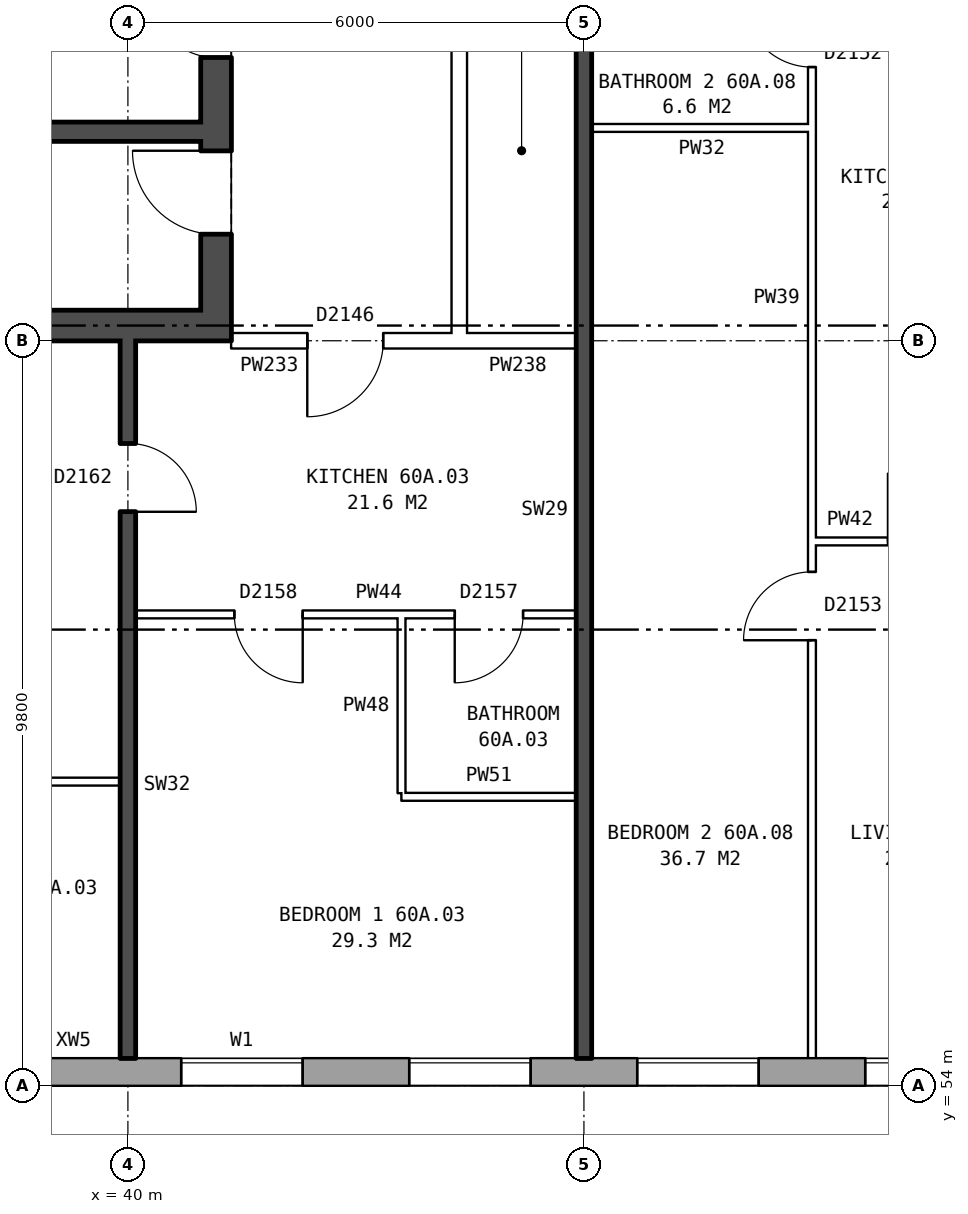
"""IFC4 building model, lengths in metres.
Left out: names, types, materials, properties, quantities, classifications, styles, units other than length and angle.
Written with IfcOpenShell. Run it as: python <this file> out.ifc"""

import sys

from ifc_helpers import new_model, si_unit, direction, frame, frame_2d, origin, place, context, subcontext, project, spatial, rectangle, extrude, element, fill, save


model = new_model("IFC4")
c1 = context("Model", 3, precision=1e-05, world=origin(), true_north=direction((0.0, 1.0)))
c2 = subcontext(c1, "Body", "Model", "MODEL_VIEW")
j1 = project(units=[si_unit("LENGTHUNIT", "METRE"), si_unit("PLANEANGLEUNIT", "RADIAN")], contexts=[c1])
p1 = place(None, origin())
s1 = spatial("IfcSite", under=j1, at=p1, CompositionType="ELEMENT")
p2 = place(p1, origin())
s2 = spatial("IfcBuilding", under=s1, at=p2, CompositionType="ELEMENT")
p3 = place(p2, frame((0.0, 0.0, 212.1)))
s3 = spatial("IfcBuildingStorey", under=s2, at=p3, CompositionType="ELEMENT", Elevation=212.1)
p4 = place(p3, frame((35.075, 54.18, 0.0), z_axis=(0.0, 0.0, 1.0), x_axis=(1.0, 0.0, 0.0)))
e1 = element("IfcWall", 1, at=p4, inside=s3, PredefinedType="STANDARD", context=c2, shape_type="SweptSolid", body=[
    extrude(rectangle(XDim=39.875, YDim=0.36, at=frame_2d((19.938, 0.0))), origin(), (0.0, 0.0, 1.0), 2.85),
])
p5 = place(p4, frame((0.3, 0.0, 0.8)))
e2 = element("IfcOpeningElement", 2, at=p5, cuts=e1, PredefinedType="OPENING", context=c2, shape_type="SweptSolid", body=[
    extrude(rectangle(XDim=0.8, YDim=1.5, at=frame_2d((0.4, 0.75))), frame((0.0, 0.19, 0.0), z_axis=(0.0, -1.0, 0.0), x_axis=(1.0, 0.0, 0.0)), (0.0, 0.0, 1.0), 0.38),
])
p6 = place(p4, frame((5.625, 0.0, 0.8)))
e3 = element("IfcOpeningElement", 3, at=p6, cuts=e1, PredefinedType="OPENING", context=c2, shape_type="SweptSolid", body=[
    extrude(rectangle(XDim=1.6, YDim=1.8, at=frame_2d((0.8, 0.9))), frame((0.0, 0.19, 0.0), z_axis=(0.0, -1.0, 0.0), x_axis=(1.0, 0.0, 0.0)), (0.0, 0.0, 1.0), 0.38),
])
p7 = place(p4, frame((8.625, 0.0, 0.8)))
e4 = element("IfcOpeningElement", 4, at=p7, cuts=e1, PredefinedType="OPENING", context=c2, shape_type="SweptSolid", body=[
    extrude(rectangle(XDim=1.6, YDim=1.8, at=frame_2d((0.8, 0.9))), frame((0.0, 0.19, 0.0), z_axis=(0.0, -1.0, 0.0), x_axis=(1.0, 0.0, 0.0)), (0.0, 0.0, 1.0), 0.38),
])
p8 = place(p4, frame((11.625, 0.0, 0.8)))
e5 = element("IfcOpeningElement", 5, at=p8, cuts=e1, PredefinedType="OPENING", context=c2, shape_type="SweptSolid", body=[
    extrude(rectangle(XDim=1.6, YDim=1.8, at=frame_2d((0.8, 0.9))), frame((0.0, 0.19, 0.0), z_axis=(0.0, -1.0, 0.0), x_axis=(1.0, 0.0, 0.0)), (0.0, 0.0, 1.0), 0.38),
])
p9 = place(p4, frame((14.625, 0.0, 0.8)))
e6 = element("IfcOpeningElement", 6, at=p9, cuts=e1, PredefinedType="OPENING", context=c2, shape_type="SweptSolid", body=[
    extrude(rectangle(XDim=1.6, YDim=1.8, at=frame_2d((0.8, 0.9))), frame((0.0, 0.19, 0.0), z_axis=(0.0, -1.0, 0.0), x_axis=(1.0, 0.0, 0.0)), (0.0, 0.0, 1.0), 0.38),
])
p10 = place(p4, frame((17.625, 0.0, 0.8)))
e7 = element("IfcOpeningElement", 7, at=p10, cuts=e1, PredefinedType="OPENING", context=c2, shape_type="SweptSolid", body=[
    extrude(rectangle(XDim=1.6, YDim=1.8, at=frame_2d((0.8, 0.9))), frame((0.0, 0.19, 0.0), z_axis=(0.0, -1.0, 0.0), x_axis=(1.0, 0.0, 0.0)), (0.0, 0.0, 1.0), 0.38),
])
p11 = place(p4, frame((20.625, 0.0, 0.8)))
e8 = element("IfcOpeningElement", 8, at=p11, cuts=e1, PredefinedType="OPENING", context=c2, shape_type="SweptSolid", body=[
    extrude(rectangle(XDim=1.6, YDim=1.8, at=frame_2d((0.8, 0.9))), frame((0.0, 0.19, 0.0), z_axis=(0.0, -1.0, 0.0), x_axis=(1.0, 0.0, 0.0)), (0.0, 0.0, 1.0), 0.38),
])
p12 = place(p4, frame((23.625, 0.0, 0.8)))
e9 = element("IfcOpeningElement", 9, at=p12, cuts=e1, PredefinedType="OPENING", context=c2, shape_type="SweptSolid", body=[
    extrude(rectangle(XDim=1.6, YDim=1.8, at=frame_2d((0.8, 0.9))), frame((0.0, 0.19, 0.0), z_axis=(0.0, -1.0, 0.0), x_axis=(1.0, 0.0, 0.0)), (0.0, 0.0, 1.0), 0.38),
])
p13 = place(p4, frame((26.625, 0.0, 0.8)))
e10 = element("IfcOpeningElement", 10, at=p13, cuts=e1, PredefinedType="OPENING", context=c2, shape_type="SweptSolid", body=[
    extrude(rectangle(XDim=1.6, YDim=1.8, at=frame_2d((0.8, 0.9))), frame((0.0, 0.19, 0.0), z_axis=(0.0, -1.0, 0.0), x_axis=(1.0, 0.0, 0.0)), (0.0, 0.0, 1.0), 0.38),
])
p14 = place(p4, frame((29.625, 0.0, 0.8)))
e11 = element("IfcOpeningElement", 11, at=p14, cuts=e1, PredefinedType="OPENING", context=c2, shape_type="SweptSolid", body=[
    extrude(rectangle(XDim=1.6, YDim=1.8, at=frame_2d((0.8, 0.9))), frame((0.0, 0.19, 0.0), z_axis=(0.0, -1.0, 0.0), x_axis=(1.0, 0.0, 0.0)), (0.0, 0.0, 1.0), 0.38),
])
p15 = place(p4, frame((31.525, 0.0, 0.8)))
e12 = element("IfcOpeningElement", 12, at=p15, cuts=e1, PredefinedType="OPENING", context=c2, shape_type="SweptSolid", body=[
    extrude(rectangle(XDim=0.8, YDim=1.5, at=frame_2d((0.4, 0.75))), frame((0.0, 0.19, 0.0), z_axis=(0.0, -1.0, 0.0), x_axis=(1.0, 0.0, 0.0)), (0.0, 0.0, 1.0), 0.38),
])
p16 = place(p4, frame((35.625, 0.0, 0.8)))
e13 = element("IfcOpeningElement", 13, at=p16, cuts=e1, PredefinedType="OPENING", context=c2, shape_type="SweptSolid", body=[
    extrude(rectangle(XDim=1.6, YDim=1.8, at=frame_2d((0.8, 0.9))), frame((0.0, 0.19, 0.0), z_axis=(0.0, -1.0, 0.0), x_axis=(1.0, 0.0, 0.0)), (0.0, 0.0, 1.0), 0.38),
])
p17 = place(p4, frame((1.4, 0.0, 0.8)))
e14 = element("IfcOpeningElement", 14, at=p17, cuts=e1, PredefinedType="OPENING", context=c2, shape_type="SweptSolid", body=[
    extrude(rectangle(XDim=1.4, YDim=1.8, at=frame_2d((0.7, 0.9))), frame((0.0, 0.19, 0.0), z_axis=(0.0, -1.0, 0.0), x_axis=(1.0, 0.0, 0.0)), (0.0, 0.0, 1.0), 0.38),
])
p18 = place(p4, frame((33.975, 0.0, 1.7)))
e15 = element("IfcOpeningElement", 15, at=p18, cuts=e1, PredefinedType="OPENING", context=c2, shape_type="SweptSolid", body=[
    extrude(rectangle(XDim=0.6, YDim=0.9, at=frame_2d((0.3, 0.45))), frame((0.0, 0.19, 0.0), z_axis=(0.0, -1.0, 0.0), x_axis=(1.0, 0.0, 0.0)), (0.0, 0.0, 1.0), 0.38),
])
p19 = place(p3, frame((41.16, 76.2, 0.0), z_axis=(0.0, 0.0, 1.0), x_axis=(0.0, -1.0, 0.0)))
e16 = element("IfcWall", 16, at=p19, inside=s3, PredefinedType="SHEAR", context=c2, shape_type="SweptSolid", body=[
    extrude(rectangle(XDim=12.4, YDim=0.4, at=frame_2d((6.2, 0.0))), origin(), (0.0, 0.0, 1.0), 2.85),
])
p20 = place(p19, frame((1.325, 0.0, 0.0)))
e17 = element("IfcOpeningElement", 17, at=p20, cuts=e16, PredefinedType="OPENING", context=c2, shape_type="SweptSolid", body=[
    extrude(rectangle(XDim=1.1, YDim=2.1, at=frame_2d((0.55, 1.05))), frame((0.0, 0.21, 0.0), z_axis=(0.0, -1.0, 0.0), x_axis=(1.0, 0.0, 0.0)), (0.0, 0.0, 1.0), 0.42),
])
p21 = place(p19, frame((4.575, 0.0, 0.0)))
e18 = element("IfcOpeningElement", 18, at=p21, cuts=e16, PredefinedType="OPENING", context=c2, shape_type="SweptSolid", body=[
    extrude(rectangle(XDim=0.85, YDim=2.1, at=frame_2d((0.425, 1.05))), frame((0.0, 0.21, 0.0), z_axis=(0.0, -1.0, 0.0), x_axis=(1.0, 0.0, 0.0)), (0.0, 0.0, 1.0), 0.42),
])
p22 = place(p19, frame((7.825, 0.0, 0.0)))
e19 = element("IfcOpeningElement", 19, at=p22, cuts=e16, PredefinedType="OPENING", context=c2, shape_type="SweptSolid", body=[
    extrude(rectangle(XDim=0.85, YDim=2.1, at=frame_2d((0.425, 1.05))), frame((0.0, 0.21, 0.0), z_axis=(0.0, -1.0, 0.0), x_axis=(1.0, 0.0, 0.0)), (0.0, 0.0, 1.0), 0.42),
])
p23 = place(p19, frame((9.9, 0.0, 0.0)))
e20 = element("IfcOpeningElement", 20, at=p23, cuts=e16, PredefinedType="OPENING", context=c2, shape_type="SweptSolid", body=[
    extrude(rectangle(XDim=1.1, YDim=2.1, at=frame_2d((0.55, 1.05))), frame((0.0, 0.21, 0.0), z_axis=(0.0, -1.0, 0.0), x_axis=(1.0, 0.0, 0.0)), (0.0, 0.0, 1.0), 0.42),
])
p24 = place(p3, frame((40.96, 64.0, 0.0), z_axis=(0.0, 0.0, 1.0), x_axis=(-1.0, 0.0, 0.0)))
e21 = element("IfcWall", 21, at=p24, inside=s3, PredefinedType="SHEAR", context=c2, shape_type="SweptSolid", body=[
    extrude(rectangle(XDim=8.2, YDim=0.4, at=frame_2d((4.1, 0.0))), origin(), (0.0, 0.0, 1.0), 2.85),
])
p25 = place(p3, frame((40.96, 66.55, 0.0), z_axis=(0.0, 0.0, 1.0), x_axis=(-1.0, 0.0, 0.0)))
e22 = element("IfcWall", 22, at=p25, inside=s3, PredefinedType="SHEAR", context=c2, shape_type="SweptSolid", body=[
    extrude(rectangle(XDim=2.525, YDim=0.25, at=frame_2d((1.262, 0.0))), origin(), (0.0, 0.0, 1.0), 2.85),
])
p26 = place(p3, frame((44.36, 63.9, 0.0), z_axis=(0.0, 0.0, 1.0), x_axis=(0.0, 1.0, 0.0)))
e23 = element("IfcWall", 23, at=p26, inside=s3, PredefinedType="PARTITIONING", context=c2, shape_type="SweptSolid", body=[
    extrude(rectangle(XDim=12.2, YDim=0.2, at=frame_2d((6.1, 0.0))), origin(), (0.0, 0.0, 1.0), 2.85),
])
p27 = place(p26, frame((5.1, 0.0, 0.0)))
e24 = element("IfcOpeningElement", 24, at=p27, cuts=e23, PredefinedType="OPENING", context=c2, shape_type="SweptSolid", body=[
    extrude(rectangle(XDim=2.0, YDim=2.1, at=frame_2d((1.0, 1.05))), frame((0.0, 0.11, 0.0), z_axis=(0.0, -1.0, 0.0), x_axis=(1.0, 0.0, 0.0)), (0.0, 0.0, 1.0), 0.22),
])
p28 = place(p3, frame((43.6, 57.8, 0.0), z_axis=(0.0, 0.0, 1.0), x_axis=(1.0, 0.0, 0.0)))
e25 = element("IfcWall", 25, at=p28, inside=s3, PredefinedType="PARTITIONING", context=c2, shape_type="SweptSolid", body=[
    extrude(rectangle(XDim=2.3, YDim=0.1, at=frame_2d((1.15, 0.0))), origin(), (0.0, 0.0, 1.0), 2.85),
])
p29 = place(p3, frame((32.36, 58.0, 0.0), z_axis=(0.0, 0.0, 1.0), x_axis=(1.0, 0.0, 0.0)))
e26 = element("IfcWall", 26, at=p29, inside=s3, PredefinedType="PARTITIONING", context=c2, shape_type="SweptSolid", body=[
    extrude(rectangle(XDim=7.54, YDim=0.1, at=frame_2d((3.77, 0.0))), origin(), (0.0, 0.0, 1.0), 2.85),
])
p30 = place(p29, frame((3.32, 0.0, 0.0)))
e27 = element("IfcOpeningElement", 27, at=p30, cuts=e26, PredefinedType="OPENING", context=c2, shape_type="SweptSolid", body=[
    extrude(rectangle(XDim=0.9, YDim=2.1, at=frame_2d((0.45, 1.05))), frame((0.0, 0.06, 0.0), z_axis=(0.0, -1.0, 0.0), x_axis=(1.0, 0.0, 0.0)), (0.0, 0.0, 1.0), 0.12),
])
p31 = place(p3, frame((40.1, 60.2, 0.0), z_axis=(0.0, 0.0, 1.0), x_axis=(1.0, 0.0, 0.0)))
e28 = element("IfcWall", 28, at=p31, inside=s3, PredefinedType="PARTITIONING", context=c2, shape_type="SweptSolid", body=[
    extrude(rectangle(XDim=5.8, YDim=0.1, at=frame_2d((2.9, 0.0))), origin(), (0.0, 0.0, 1.0), 2.85),
])
p32 = place(p31, frame((1.3, 0.0, 0.0)))
e29 = element("IfcOpeningElement", 29, at=p32, cuts=e28, PredefinedType="OPENING", context=c2, shape_type="SweptSolid", body=[
    extrude(rectangle(XDim=0.9, YDim=2.1, at=frame_2d((0.45, 1.05))), frame((0.0, 0.06, 0.0), z_axis=(0.0, -1.0, 0.0), x_axis=(1.0, 0.0, 0.0)), (0.0, 0.0, 1.0), 0.12),
])
p33 = place(p31, frame((4.2, 0.0, 0.0)))
e30 = element("IfcOpeningElement", 30, at=p33, cuts=e28, PredefinedType="OPENING", context=c2, shape_type="SweptSolid", body=[
    extrude(rectangle(XDim=0.9, YDim=2.1, at=frame_2d((0.45, 1.05))), frame((0.0, 0.06, 0.0), z_axis=(0.0, -1.0, 0.0), x_axis=(1.0, 0.0, 0.0)), (0.0, 0.0, 1.0), 0.12),
])
p34 = place(p3, frame((49.0, 61.16, 0.0), z_axis=(0.0, 0.0, 1.0), x_axis=(1.0, 0.0, 0.0)))
e31 = element("IfcWall", 31, at=p34, inside=s3, PredefinedType="PARTITIONING", context=c2, shape_type="SweptSolid", body=[
    extrude(rectangle(XDim=2.9, YDim=0.1, at=frame_2d((1.45, 0.0))), origin(), (0.0, 0.0, 1.0), 2.85),
])
p35 = place(p34, frame((1.0, 0.0, 0.0)))
e32 = element("IfcOpeningElement", 32, at=p35, cuts=e31, PredefinedType="OPENING", context=c2, shape_type="SweptSolid", body=[
    extrude(rectangle(XDim=0.9, YDim=2.1, at=frame_2d((0.45, 1.05))), frame((0.0, 0.06, 0.0), z_axis=(0.0, -1.0, 0.0), x_axis=(1.0, 0.0, 0.0)), (0.0, 0.0, 1.0), 0.12),
])
p36 = place(p3, frame((41.36, 63.8, 0.0), z_axis=(0.0, 0.0, 1.0), x_axis=(1.0, 0.0, 0.0)))
e33 = element("IfcWall", 33, at=p36, inside=s3, PredefinedType="PARTITIONING", context=c2, shape_type="SweptSolid", body=[
    extrude(rectangle(XDim=3.0, YDim=0.2, at=frame_2d((1.5, 0.0))), origin(), (0.0, 0.0, 1.0), 2.85),
])
p37 = place(p36, frame((1.0, 0.0, 0.0)))
e34 = element("IfcOpeningElement", 34, at=p37, cuts=e33, PredefinedType="OPENING", context=c2, shape_type="SweptSolid", body=[
    extrude(rectangle(XDim=1.0, YDim=2.1, at=frame_2d((0.5, 1.05))), frame((0.0, 0.11, 0.0), z_axis=(0.0, -1.0, 0.0), x_axis=(1.0, 0.0, 0.0)), (0.0, 0.0, 1.0), 0.22),
])
p38 = place(p3, frame((44.36, 63.8, 0.0), z_axis=(0.0, 0.0, 1.0), x_axis=(1.0, 0.0, 0.0)))
e35 = element("IfcWall", 35, at=p38, inside=s3, PredefinedType="PARTITIONING", context=c2, shape_type="SweptSolid", body=[
    extrude(rectangle(XDim=1.54, YDim=0.2, at=frame_2d((0.77, 0.0))), origin(), (0.0, 0.0, 1.0), 2.85),
])
p39 = place(p3, frame((46.1, 66.6, 0.0), z_axis=(0.0, 0.0, 1.0), x_axis=(1.0, 0.0, 0.0)))
e36 = element("IfcWall", 36, at=p39, inside=s3, PredefinedType="PARTITIONING", context=c2, shape_type="SweptSolid", body=[
    extrude(rectangle(XDim=2.9, YDim=0.1, at=frame_2d((1.45, 0.0))), origin(), (0.0, 0.0, 1.0), 2.85),
])
p40 = place(p3, frame((40.0, 54.36, 0.0), z_axis=(0.0, 0.0, 1.0), x_axis=(0.0, 1.0, 0.0)))
e37 = element("IfcWall", 37, at=p40, inside=s3, PredefinedType="SOLIDWALL", context=c2, shape_type="SweptSolid", body=[
    extrude(rectangle(XDim=9.44, YDim=0.2, at=frame_2d((4.72, 0.0))), origin(), (0.0, 0.0, 1.0), 2.85),
])
p41 = place(p40, frame((7.19, 0.0, 0.0)))
e38 = element("IfcOpeningElement", 38, at=p41, cuts=e37, PredefinedType="OPENING", context=c2, shape_type="SweptSolid", body=[
    extrude(rectangle(XDim=0.9, YDim=2.1, at=frame_2d((0.45, 1.05))), frame((0.0, 0.11, 0.0), z_axis=(0.0, -1.0, 0.0), x_axis=(1.0, 0.0, 0.0)), (0.0, 0.0, 1.0), 0.22),
])
p42 = place(p3, frame((43.6, 57.85, 0.0), z_axis=(0.0, 0.0, 1.0), x_axis=(0.0, 1.0, 0.0)))
e39 = element("IfcWall", 39, at=p42, inside=s3, PredefinedType="PARTITIONING", context=c2, shape_type="SweptSolid", body=[
    extrude(rectangle(XDim=2.3, YDim=0.1, at=frame_2d((1.15, 0.0))), origin(), (0.0, 0.0, 1.0), 2.85),
])
p43 = place(p3, frame((46.0, 54.36, 0.0), z_axis=(0.0, 0.0, 1.0), x_axis=(0.0, 1.0, 0.0)))
e40 = element("IfcWall", 40, at=p43, inside=s3, PredefinedType="SOLIDWALL", context=c2, shape_type="SweptSolid", body=[
    extrude(rectangle(XDim=14.44, YDim=0.2, at=frame_2d((7.22, 0.0))), origin(), (0.0, 0.0, 1.0), 2.85),
])
p44 = place(p3, frame((49.0, 54.36, 0.0), z_axis=(0.0, 0.0, 1.0), x_axis=(0.0, 1.0, 0.0)))
e41 = element("IfcWall", 41, at=p44, inside=s3, PredefinedType="PARTITIONING", context=c2, shape_type="SweptSolid", body=[
    extrude(rectangle(XDim=14.34, YDim=0.1, at=frame_2d((7.17, 0.0))), origin(), (0.0, 0.0, 1.0), 2.85),
])
p45 = place(p44, frame((5.5, 0.0, 0.0)))
e42 = element("IfcOpeningElement", 42, at=p45, cuts=e41, PredefinedType="OPENING", context=c2, shape_type="SweptSolid", body=[
    extrude(rectangle(XDim=0.9, YDim=2.1, at=frame_2d((0.45, 1.05))), frame((0.0, 0.06, 0.0), z_axis=(0.0, -1.0, 0.0), x_axis=(1.0, 0.0, 0.0)), (0.0, 0.0, 1.0), 0.12),
])
p46 = place(p44, frame((13.04, 0.0, 0.0)))
e43 = element("IfcOpeningElement", 43, at=p46, cuts=e41, PredefinedType="OPENING", context=c2, shape_type="SweptSolid", body=[
    extrude(rectangle(XDim=0.9, YDim=2.1, at=frame_2d((0.45, 1.05))), frame((0.0, 0.06, 0.0), z_axis=(0.0, -1.0, 0.0), x_axis=(1.0, 0.0, 0.0)), (0.0, 0.0, 1.0), 0.12),
])
p47 = place(p6, origin())
e44 = element("IfcWindow", 44, at=p47, inside=s3, PartitioningType="SINGLE_PANEL", PredefinedType="WINDOW", context=c2, shape_type="SweptSolid", body=[
    extrude(rectangle(XDim=1.6, YDim=1.8, at=frame_2d((0.8, 0.9))), frame((0.0, 0.15, 0.0), z_axis=(0.0, -1.0, 0.0), x_axis=(1.0, 0.0, 0.0)), (0.0, 0.0, 1.0), 0.06),
])
fill(e3, e44)
p48 = place(p7, origin())
e45 = element("IfcWindow", 45, at=p48, inside=s3, PartitioningType="SINGLE_PANEL", PredefinedType="WINDOW", context=c2, shape_type="SweptSolid", body=[
    extrude(rectangle(XDim=1.6, YDim=1.8, at=frame_2d((0.8, 0.9))), frame((0.0, 0.15, 0.0), z_axis=(0.0, -1.0, 0.0), x_axis=(1.0, 0.0, 0.0)), (0.0, 0.0, 1.0), 0.06),
])
fill(e4, e45)
p49 = place(p8, origin())
e46 = element("IfcWindow", 46, at=p49, inside=s3, PartitioningType="SINGLE_PANEL", PredefinedType="WINDOW", context=c2, shape_type="SweptSolid", body=[
    extrude(rectangle(XDim=1.6, YDim=1.8, at=frame_2d((0.8, 0.9))), frame((0.0, 0.15, 0.0), z_axis=(0.0, -1.0, 0.0), x_axis=(1.0, 0.0, 0.0)), (0.0, 0.0, 1.0), 0.06),
])
fill(e5, e46)
p50 = place(p9, origin())
e47 = element("IfcWindow", 47, at=p50, inside=s3, PartitioningType="SINGLE_PANEL", PredefinedType="WINDOW", context=c2, shape_type="SweptSolid", body=[
    extrude(rectangle(XDim=1.6, YDim=1.8, at=frame_2d((0.8, 0.9))), frame((0.0, 0.15, 0.0), z_axis=(0.0, -1.0, 0.0), x_axis=(1.0, 0.0, 0.0)), (0.0, 0.0, 1.0), 0.06),
])
fill(e6, e47)
p51 = place(p22, frame((0.85, 0.0, 0.0), z_axis=(0.0, 0.0, 1.0), x_axis=(-1.0, 0.0, 0.0)))
e48 = element("IfcDoor", 48, at=p51, inside=s3, OperationType="SINGLE_SWING_RIGHT", PredefinedType="DOOR", context=c2, shape_type="SweptSolid", body=[
    extrude(rectangle(XDim=0.85, YDim=2.1, at=frame_2d((0.425, 1.05))), frame((0.0, 0.185, 0.0), z_axis=(0.0, -1.0, 0.0), x_axis=(1.0, 0.0, 0.0)), (0.0, 0.0, 1.0), 0.05),
])
fill(e19, e48)
p52 = place(p23, frame((1.1, 0.0, 0.0), z_axis=(0.0, 0.0, 1.0), x_axis=(-1.0, 0.0, 0.0)))
e49 = element("IfcDoor", 49, at=p52, inside=s3, OperationType="SINGLE_SWING_RIGHT", PredefinedType="DOOR", context=c2, shape_type="SweptSolid", body=[
    extrude(rectangle(XDim=1.1, YDim=2.1, at=frame_2d((0.55, 1.05))), frame((0.0, 0.185, 0.0), z_axis=(0.0, -1.0, 0.0), x_axis=(1.0, 0.0, 0.0)), (0.0, 0.0, 1.0), 0.05),
])
fill(e20, e49)
p53 = place(p32, frame((0.9, 0.0, 0.0), z_axis=(0.0, 0.0, 1.0), x_axis=(-1.0, 0.0, 0.0)))
e50 = element("IfcDoor", 50, at=p53, inside=s3, OperationType="SINGLE_SWING_LEFT", PredefinedType="DOOR", context=c2, shape_type="SweptSolid", body=[
    extrude(rectangle(XDim=0.9, YDim=2.1, at=frame_2d((0.45, 1.05))), frame((0.0, 0.025, 0.0), z_axis=(0.0, -1.0, 0.0), x_axis=(1.0, 0.0, 0.0)), (0.0, 0.0, 1.0), 0.05),
])
fill(e29, e50)
p54 = place(p37, frame((1.0, 0.0, 0.0), z_axis=(0.0, 0.0, 1.0), x_axis=(-1.0, 0.0, 0.0)))
e51 = element("IfcDoor", 51, at=p54, inside=s3, OperationType="SINGLE_SWING_RIGHT", PredefinedType="DOOR", context=c2, shape_type="SweptSolid", body=[
    extrude(rectangle(XDim=1.0, YDim=2.1, at=frame_2d((0.5, 1.05))), frame((0.0, 0.025, 0.0), z_axis=(0.0, -1.0, 0.0), x_axis=(1.0, 0.0, 0.0)), (0.0, 0.0, 1.0), 0.05),
])
fill(e34, e51)
p55 = place(p41, frame((0.9, 0.0, 0.0), z_axis=(0.0, 0.0, 1.0), x_axis=(-1.0, 0.0, 0.0)))
e52 = element("IfcDoor", 52, at=p55, inside=s3, OperationType="SINGLE_SWING_RIGHT", PredefinedType="DOOR", context=c2, shape_type="SweptSolid", body=[
    extrude(rectangle(XDim=0.9, YDim=2.1, at=frame_2d((0.45, 1.05))), frame((0.0, 0.025, 0.0), z_axis=(0.0, -1.0, 0.0), x_axis=(1.0, 0.0, 0.0)), (0.0, 0.0, 1.0), 0.05),
])
fill(e38, e52)
p56 = place(p33, frame((0.9, 0.0, 0.0), z_axis=(0.0, 0.0, 1.0), x_axis=(-1.0, 0.0, 0.0)))
e53 = element("IfcDoor", 53, at=p56, inside=s3, OperationType="SINGLE_SWING_RIGHT", PredefinedType="DOOR", context=c2, shape_type="SweptSolid", body=[
    extrude(rectangle(XDim=0.9, YDim=2.1, at=frame_2d((0.45, 1.05))), frame((0.0, 0.025, 0.0), z_axis=(0.0, -1.0, 0.0), x_axis=(1.0, 0.0, 0.0)), (0.0, 0.0, 1.0), 0.05),
])
fill(e30, e53)
p57 = place(p45, origin())
e54 = element("IfcDoor", 54, at=p57, inside=s3, OperationType="SINGLE_SWING_LEFT", PredefinedType="DOOR", context=c2, shape_type="SweptSolid", body=[
    extrude(rectangle(XDim=0.9, YDim=2.1, at=frame_2d((0.45, 1.05))), frame((0.0, 0.025, 0.0), z_axis=(0.0, -1.0, 0.0), x_axis=(1.0, 0.0, 0.0)), (0.0, 0.0, 1.0), 0.05),
])
fill(e42, e54)
p58 = place(p46, origin())
e55 = element("IfcDoor", 55, at=p58, inside=s3, OperationType="SINGLE_SWING_RIGHT", PredefinedType="DOOR", context=c2, shape_type="SweptSolid", body=[
    extrude(rectangle(XDim=0.9, YDim=2.1, at=frame_2d((0.45, 1.05))), frame((0.0, 0.025, 0.0), z_axis=(0.0, -1.0, 0.0), x_axis=(1.0, 0.0, 0.0)), (0.0, 0.0, 1.0), 0.05),
])
fill(e43, e55)
save(model, sys.argv[1])
